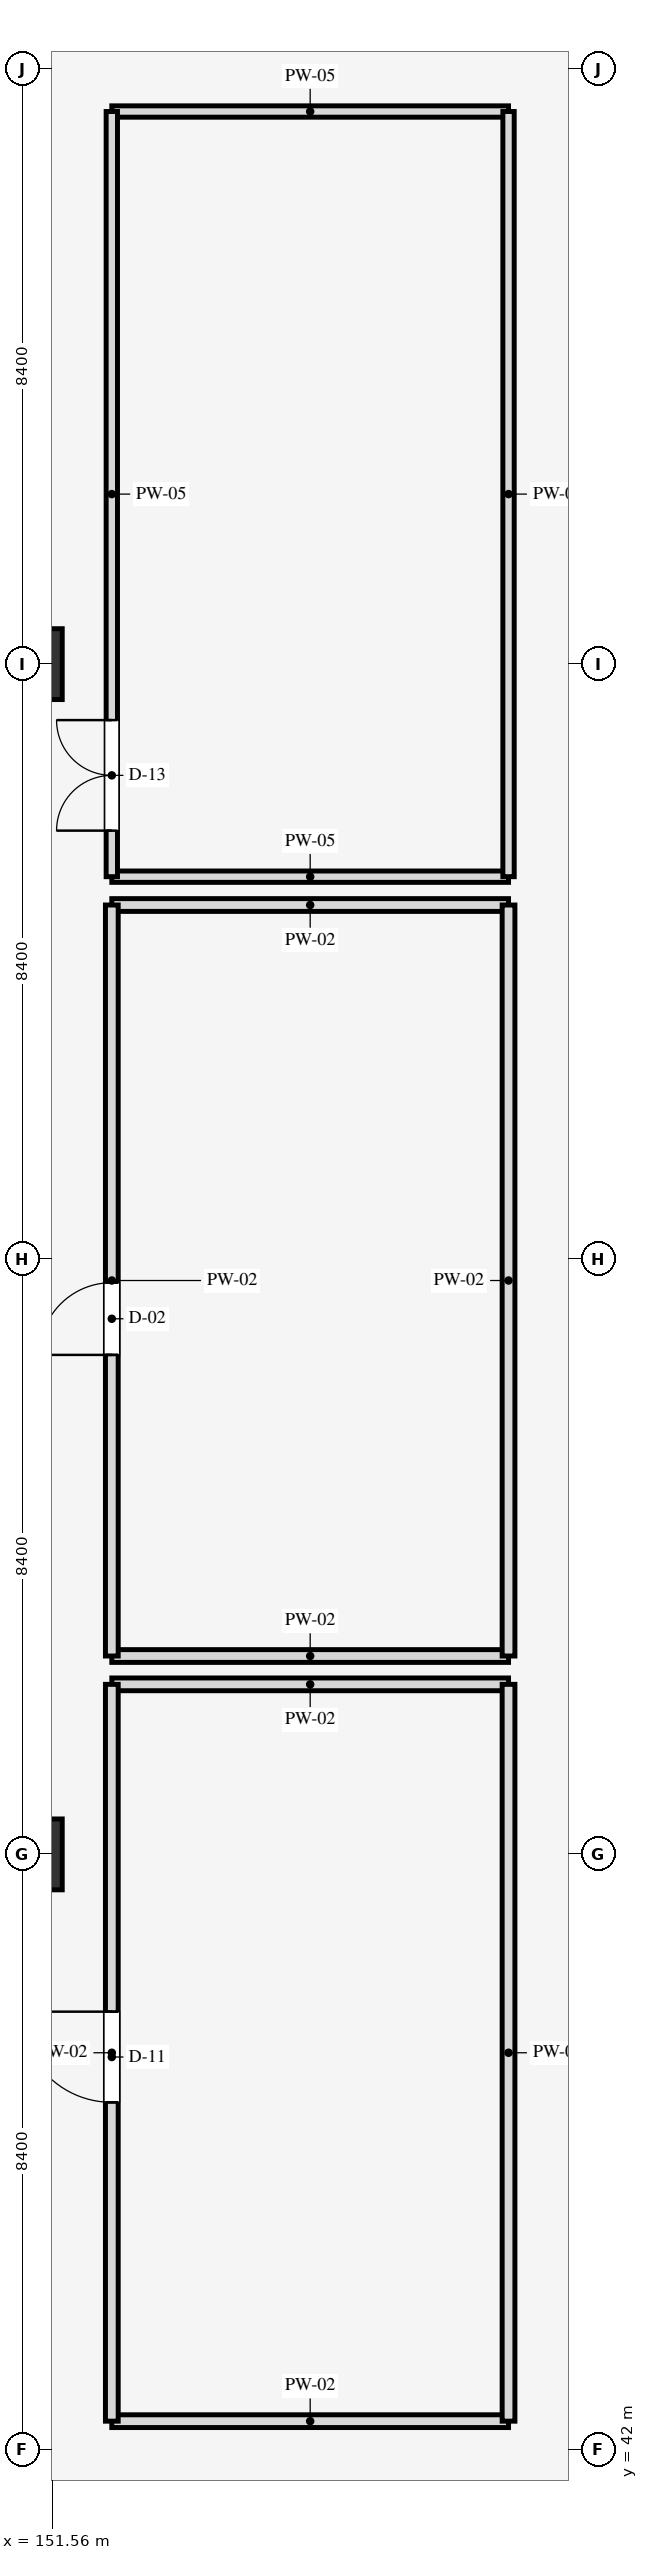
"""IFC4 building model, lengths in metres.
Left out: names, types, materials, properties, quantities, classifications, styles, units other than length and angle.
Written with IfcOpenShell. Run it as: python <this file> out.ifc"""

import sys

from ifc_helpers import new_model, si_unit, direction, frame, frame_2d, origin, origin_2d, place, context, subcontext, project, spatial, rectangle, extrude, element, fill, save


model = new_model("IFC4")
c1 = context("Model", 3, precision=1e-05, world=origin(), true_north=direction((0.0, 1.0)))
c2 = subcontext(c1, "Body", "Model", "MODEL_VIEW")
j1 = project(units=[si_unit("LENGTHUNIT", "METRE"), si_unit("PLANEANGLEUNIT", "RADIAN")], contexts=[c1])
p1 = place(None, origin())
s1 = spatial("IfcSite", under=j1, at=p1, CompositionType="ELEMENT")
p2 = place(p1, origin())
s2 = spatial("IfcBuilding", under=s1, at=p2, CompositionType="ELEMENT")
p3 = place(p2, frame((0.0, 0.0, 53.1)))
s3 = spatial("IfcBuildingStorey", under=s2, at=p3, CompositionType="ELEMENT", Elevation=53.1)
for number, where, z_axis, x_axis in (
    (1, (151.2, 50.4, 0.0), (0.0, 0.0, 1.0), (1.0, 0.0, 0.0)),
    (2, (151.2, 67.2, 0.0), (0.0, 0.0, 1.0), (1.0, 0.0, 0.0)),
):
    element("IfcColumn", number, at=place(p3, frame(where, z_axis=z_axis, x_axis=x_axis)), inside=s3, PredefinedType="COLUMN", context=c2, shape_type="SweptSolid", body=[
        extrude(rectangle(XDim=1.0, YDim=1.0, at=origin_2d()), origin(), (0.0, 0.0, 1.0), 4.2),
    ])
for number, where, z_axis, x_axis in (
    (3, (152.4, 42.4, 0.0), (0.0, 0.0, 1.0), (1.0, 0.0, 0.0)),
    (4, (152.4, 52.8, 0.0), (0.0, 0.0, 1.0), (1.0, 0.0, 0.0)),
):
    element("IfcWall", number, at=place(p3, frame(where, z_axis=z_axis, x_axis=x_axis)), inside=s3, PredefinedType="PARTITIONING", context=c2, shape_type="SweptSolid", body=[
        extrude(rectangle(XDim=5.6, YDim=0.18, at=frame_2d((2.8, 0.0))), origin(), (0.0, 0.0, 1.0), 3.24),
    ])
p4 = place(p3, frame((152.4, 42.4, 0.0), z_axis=(0.0, 0.0, 1.0), x_axis=(0.0, 1.0, 0.0)))
e5 = element("IfcWall", 5, at=p4, inside=s3, PredefinedType="PARTITIONING", context=c2, shape_type="SweptSolid", body=[
    extrude(rectangle(XDim=10.4, YDim=0.18, at=frame_2d((5.2, 0.0))), origin(), (0.0, 0.0, 1.0), 3.24),
])
p5 = place(p4, frame((4.5, 0.0, 0.0)))
e6 = element("IfcOpeningElement", 6, at=p5, cuts=e5, PredefinedType="OPENING", context=c2, shape_type="SweptSolid", body=[
    extrude(rectangle(XDim=1.28, YDim=2.16, at=frame_2d((0.64, 1.08))), frame((0.0, 0.1, 0.0), z_axis=(0.0, -1.0, 0.0), x_axis=(1.0, 0.0, 0.0)), (0.0, 0.0, 1.0), 0.2),
])
p6 = place(p3, frame((158.0, 42.4, 0.0), z_axis=(0.0, 0.0, 1.0), x_axis=(0.0, 1.0, 0.0)))
e7 = element("IfcWall", 7, at=p6, inside=s3, PredefinedType="PARTITIONING", context=c2, shape_type="SweptSolid", body=[
    extrude(rectangle(XDim=10.4, YDim=0.18, at=frame_2d((5.2, 0.0))), origin(), (0.0, 0.0, 1.0), 3.24),
])
for number, where, z_axis, x_axis in (
    (8, (152.4, 53.2, 0.0), (0.0, 0.0, 1.0), (1.0, 0.0, 0.0)),
    (9, (152.4, 63.8, 0.0), (0.0, 0.0, 1.0), (1.0, 0.0, 0.0)),
):
    element("IfcWall", number, at=place(p3, frame(where, z_axis=z_axis, x_axis=x_axis)), inside=s3, PredefinedType="PARTITIONING", context=c2, shape_type="SweptSolid", body=[
        extrude(rectangle(XDim=5.6, YDim=0.18, at=frame_2d((2.8, 0.0))), origin(), (0.0, 0.0, 1.0), 3.24),
    ])
p7 = place(p3, frame((152.4, 53.2, 0.0), z_axis=(0.0, 0.0, 1.0), x_axis=(0.0, 1.0, 0.0)))
e10 = element("IfcWall", 10, at=p7, inside=s3, PredefinedType="PARTITIONING", context=c2, shape_type="SweptSolid", body=[
    extrude(rectangle(XDim=10.6, YDim=0.18, at=frame_2d((5.3, 0.0))), origin(), (0.0, 0.0, 1.0), 3.24),
])
p8 = place(p7, frame((4.25, 0.0, 0.0)))
e11 = element("IfcOpeningElement", 11, at=p8, cuts=e10, PredefinedType="OPENING", context=c2, shape_type="SweptSolid", body=[
    extrude(rectangle(XDim=1.02, YDim=2.1, at=frame_2d((0.51, 1.05))), frame((0.0, 0.1, 0.0), z_axis=(0.0, -1.0, 0.0), x_axis=(1.0, 0.0, 0.0)), (0.0, 0.0, 1.0), 0.2),
])
p9 = place(p3, frame((158.0, 53.2, 0.0), z_axis=(0.0, 0.0, 1.0), x_axis=(0.0, 1.0, 0.0)))
e12 = element("IfcWall", 12, at=p9, inside=s3, PredefinedType="PARTITIONING", context=c2, shape_type="SweptSolid", body=[
    extrude(rectangle(XDim=10.6, YDim=0.18, at=frame_2d((5.3, 0.0))), origin(), (0.0, 0.0, 1.0), 3.24),
])
for number, where, z_axis, x_axis in (
    (13, (152.4, 64.2, 0.0), (0.0, 0.0, 1.0), (1.0, 0.0, 0.0)),
    (14, (152.4, 75.0, 0.0), (0.0, 0.0, 1.0), (1.0, 0.0, 0.0)),
):
    element("IfcWall", number, at=place(p3, frame(where, z_axis=z_axis, x_axis=x_axis)), inside=s3, PredefinedType="PARTITIONING", context=c2, shape_type="SweptSolid", body=[
        extrude(rectangle(XDim=5.6, YDim=0.16, at=frame_2d((2.8, 0.0))), origin(), (0.0, 0.0, 1.0), 3.24),
    ])
p10 = place(p3, frame((152.4, 64.2, 0.0), z_axis=(0.0, 0.0, 1.0), x_axis=(0.0, 1.0, 0.0)))
e15 = element("IfcWall", 15, at=p10, inside=s3, PredefinedType="PARTITIONING", context=c2, shape_type="SweptSolid", body=[
    extrude(rectangle(XDim=10.8, YDim=0.16, at=frame_2d((5.4, 0.0))), origin(), (0.0, 0.0, 1.0), 3.24),
])
p11 = place(p10, frame((0.65, 0.0, 0.0)))
e16 = element("IfcOpeningElement", 16, at=p11, cuts=e15, PredefinedType="OPENING", context=c2, shape_type="SweptSolid", body=[
    extrude(rectangle(XDim=1.56, YDim=2.2, at=frame_2d((0.78, 1.1))), frame((0.0, 0.09, 0.0), z_axis=(0.0, -1.0, 0.0), x_axis=(1.0, 0.0, 0.0)), (0.0, 0.0, 1.0), 0.18),
])
p12 = place(p3, frame((158.0, 64.2, 0.0), z_axis=(0.0, 0.0, 1.0), x_axis=(0.0, 1.0, 0.0)))
e17 = element("IfcWall", 17, at=p12, inside=s3, PredefinedType="PARTITIONING", context=c2, shape_type="SweptSolid", body=[
    extrude(rectangle(XDim=10.8, YDim=0.16, at=frame_2d((5.4, 0.0))), origin(), (0.0, 0.0, 1.0), 3.24),
])
p13 = place(p5, origin())
e18 = element("IfcDoor", 18, at=p13, inside=s3, OperationType="SINGLE_SWING_RIGHT", PredefinedType="DOOR", context=c2, shape_type="SweptSolid", body=[
    extrude(rectangle(XDim=1.28, YDim=2.16, at=frame_2d((0.64, 1.08))), frame((0.0, 0.025, 0.0), z_axis=(0.0, -1.0, 0.0), x_axis=(1.0, 0.0, 0.0)), (0.0, 0.0, 1.0), 0.05),
])
fill(e6, e18)
p14 = place(p8, origin())
e19 = element("IfcDoor", 19, at=p14, inside=s3, OperationType="SINGLE_SWING_LEFT", PredefinedType="DOOR", context=c2, shape_type="SweptSolid", body=[
    extrude(rectangle(XDim=1.02, YDim=2.1, at=frame_2d((0.51, 1.05))), frame((0.0, 0.025, 0.0), z_axis=(0.0, -1.0, 0.0), x_axis=(1.0, 0.0, 0.0)), (0.0, 0.0, 1.0), 0.05),
])
fill(e11, e19)
p15 = place(p11, origin())
e20 = element("IfcDoor", 20, at=p15, inside=s3, OperationType="DOUBLE_DOOR_SINGLE_SWING", PredefinedType="DOOR", context=c2, shape_type="SweptSolid", body=[
    extrude(rectangle(XDim=1.56, YDim=2.2, at=frame_2d((0.78, 1.1))), frame((0.0, 0.025, 0.0), z_axis=(0.0, -1.0, 0.0), x_axis=(1.0, 0.0, 0.0)), (0.0, 0.0, 1.0), 0.05),
])
fill(e16, e20)
save(model, sys.argv[1])
